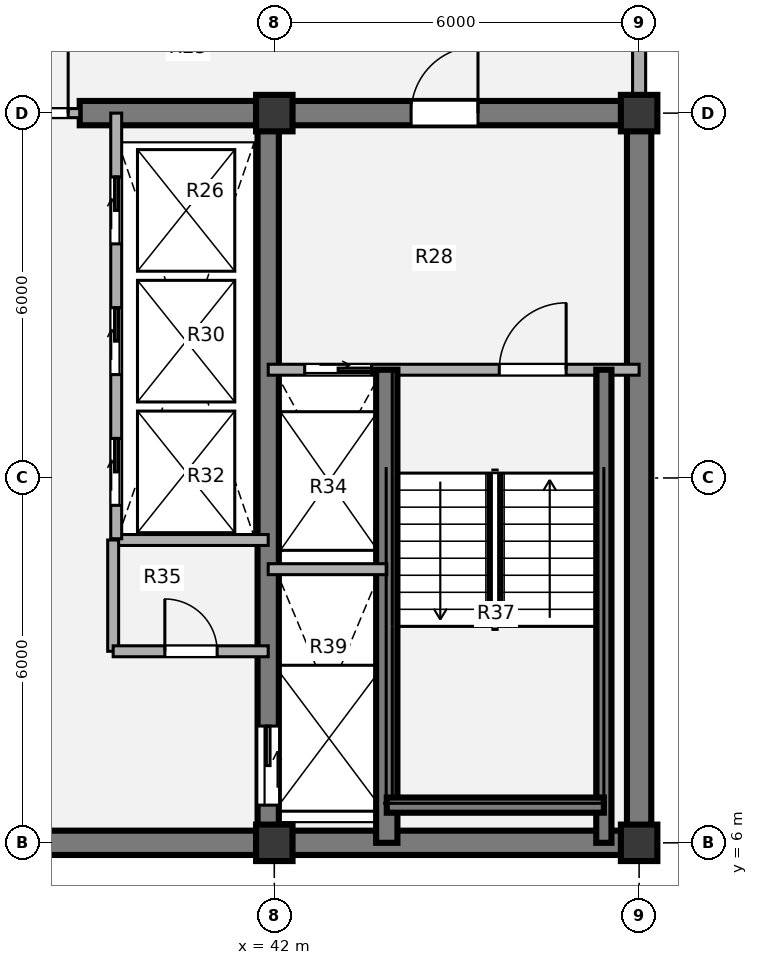
"""IFC4 building model, lengths in metres.
Left out: names, types, materials, properties, quantities, classifications, styles, units other than length and angle.
Written with IfcOpenShell. Run it as: python <this file> out.ifc"""

import sys

from ifc_helpers import new_model, si_unit, direction, frame, frame_2d, origin, origin_2d, place, context, subcontext, project, spatial, rectangle, extrude, source, transform, mapped, element, fill, save


model = new_model("IFC4")
c1 = context("Model", 3, precision=1e-05, world=origin(), true_north=direction((0.0, 1.0)))
c2 = subcontext(c1, "Body", "Model", "MODEL_VIEW")
j1 = project(units=[si_unit("LENGTHUNIT", "METRE"), si_unit("PLANEANGLEUNIT", "RADIAN")], contexts=[c1])
p1 = place(None, origin())
s1 = spatial("IfcSite", under=j1, at=p1, CompositionType="ELEMENT")
p2 = place(p1, origin())
s2 = spatial("IfcBuilding", under=s1, at=p2, CompositionType="ELEMENT")
p3 = place(p2, frame((0.0, 0.0, 223.02)))
s3 = spatial("IfcBuildingStorey", under=s2, at=p3, CompositionType="ELEMENT", Elevation=223.02)
m1 = source(origin(), c2, "Body", "SweptSolid", [
    extrude(rectangle(XDim=0.6, YDim=0.6, at=origin_2d()), origin(), (0.0, 0.0, 1.0), 3.78),
])
for number, where, z_axis, x_axis in (
    (1, (42.0, 6.0, 0.0), (0.0, 0.0, 1.0), (1.0, 0.0, 0.0)),
    (2, (48.0, 6.0, 0.0), (0.0, 0.0, 1.0), (1.0, 0.0, 0.0)),
    (3, (42.0, 18.0, 0.0), (0.0, 0.0, 1.0), (1.0, 0.0, 0.0)),
    (4, (48.0, 18.0, 0.0), (0.0, 0.0, 1.0), (1.0, 0.0, 0.0)),
):
    element("IfcColumn", number, at=place(p3, frame(where, z_axis=z_axis, x_axis=x_axis)), inside=s3, PredefinedType="COLUMN", context=c2, shape_type="MappedRepresentation", body=[
        mapped(m1, transform((0.0, 0.0, 0.0), x_axis=(1.0, 0.0, 0.0), y_axis=(0.0, 1.0, 0.0), z_axis=(0.0, 0.0, 1.0), scale=1.0)),
    ])
p4 = place(p3, frame((48.2, 6.0, 0.0), z_axis=(0.0, 0.0, 1.0), x_axis=(-1.0, 0.0, 0.0)))
e5 = element("IfcWall", 5, at=p4, inside=s3, PredefinedType="SHEAR", context=c2, shape_type="SweptSolid", body=[
    extrude(rectangle(XDim=24.4, YDim=0.4, at=frame_2d((12.2, 0.0))), origin(), (0.0, 0.0, 1.0), 3.78),
])
p5 = place(p3, frame((48.0, 18.0, 0.0), z_axis=(0.0, 0.0, 1.0), x_axis=(0.0, -1.0, 0.0)))
e6 = element("IfcWall", 6, at=p5, inside=s3, PredefinedType="SHEAR", context=c2, shape_type="SweptSolid", body=[
    extrude(rectangle(XDim=12.0, YDim=0.4, at=frame_2d((6.0, 0.0))), origin(), (0.0, 0.0, 1.0), 3.78),
])
p6 = place(p3, frame((38.8, 18.0, 0.0), z_axis=(0.0, 0.0, 1.0), x_axis=(1.0, 0.0, 0.0)))
e7 = element("IfcWall", 7, at=p6, inside=s3, PredefinedType="SHEAR", context=c2, shape_type="SweptSolid", body=[
    extrude(rectangle(XDim=9.4, YDim=0.4, at=frame_2d((4.7, 0.0))), origin(), (0.0, 0.0, 1.0), 3.78),
])
p7 = place(p6, frame((5.45, 0.0, 0.0)))
e8 = element("IfcOpeningElement", 8, at=p7, cuts=e7, PredefinedType="OPENING", context=c2, shape_type="SweptSolid", body=[
    extrude(rectangle(XDim=1.1, YDim=2.1, at=origin_2d()), frame((0.55, 0.21, 1.05), z_axis=(0.0, -1.0, 0.0), x_axis=(1.0, 0.0, 0.0)), (0.0, 0.0, 1.0), 0.42),
])
p8 = place(p3, frame((41.9, 18.0, 0.0), z_axis=(0.0, 0.0, 1.0), x_axis=(0.0, -1.0, 0.0)))
e9 = element("IfcWall", 9, at=p8, inside=s3, PredefinedType="SHEAR", context=c2, shape_type="SweptSolid", body=[
    extrude(rectangle(XDim=12.0, YDim=0.35, at=frame_2d((6.0, 0.0))), origin(), (0.0, 0.0, 1.0), 3.78),
])
p9 = place(p8, frame((10.08, 0.0, 0.0)))
e10 = element("IfcOpeningElement", 10, at=p9, cuts=e9, PredefinedType="OPENING", context=c2, shape_type="SweptSolid", body=[
    extrude(rectangle(XDim=1.3, YDim=2.1, at=origin_2d()), frame((0.65, 0.185, 1.05), z_axis=(0.0, -1.0, 0.0), x_axis=(1.0, 0.0, 0.0)), (0.0, 0.0, 1.0), 0.37),
])
p10 = place(p3, frame((48.0, 21.05, 0.0), z_axis=(0.0, 0.0, 1.0), x_axis=(0.0, -1.0, 0.0)))
e11 = element("IfcWall", 11, at=p10, inside=s3, PredefinedType="SOLIDWALL", context=c2, shape_type="SweptSolid", body=[
    extrude(rectangle(XDim=2.77, YDim=0.215, at=frame_2d((1.385, 0.0))), origin(), (0.0, 0.0, 1.0), 2.718),
])
p11 = place(p3, frame((39.35, 10.98, 0.0), z_axis=(0.0, 0.0, 1.0), x_axis=(1.0, 0.0, 0.0)))
e12 = element("IfcWall", 12, at=p11, inside=s3, PredefinedType="PARTITIONING", context=c2, shape_type="SweptSolid", body=[
    extrude(rectangle(XDim=2.55, YDim=0.18, at=frame_2d((1.275, 0.0))), origin(), (0.0, 0.0, 1.0), 3.5),
])
p12 = place(p3, frame((39.35, 9.15, 0.0), z_axis=(0.0, 0.0, 1.0), x_axis=(0.0, 1.0, 0.0)))
e13 = element("IfcWall", 13, at=p12, inside=s3, PredefinedType="PARTITIONING", context=c2, shape_type="SweptSolid", body=[
    extrude(rectangle(XDim=1.83, YDim=0.18, at=frame_2d((0.915, 0.0))), origin(), (0.0, 0.0, 1.0), 3.5),
])
p13 = place(p3, frame((39.35, 9.15, 0.0), z_axis=(0.0, 0.0, 1.0), x_axis=(1.0, 0.0, 0.0)))
e14 = element("IfcWall", 14, at=p13, inside=s3, PredefinedType="PARTITIONING", context=c2, shape_type="SweptSolid", body=[
    extrude(rectangle(XDim=2.55, YDim=0.18, at=frame_2d((1.275, 0.0))), origin(), (0.0, 0.0, 1.0), 3.5),
])
p14 = place(p13, frame((0.85, 0.0, 0.0)))
e15 = element("IfcOpeningElement", 15, at=p14, cuts=e14, PredefinedType="OPENING", context=c2, shape_type="SweptSolid", body=[
    extrude(rectangle(XDim=0.86, YDim=2.1, at=origin_2d()), frame((0.43, 0.1, 1.05), z_axis=(0.0, -1.0, 0.0), x_axis=(1.0, 0.0, 0.0)), (0.0, 0.0, 1.0), 0.2),
])
p15 = place(p3, frame((33.2, 18.0, 0.0), z_axis=(0.0, 0.0, 1.0), x_axis=(1.0, 0.0, 0.0)))
e16 = element("IfcWall", 16, at=p15, inside=s3, PredefinedType="PARTITIONING", context=c2, shape_type="SweptSolid", body=[
    extrude(rectangle(XDim=5.6, YDim=0.15, at=frame_2d((2.8, 0.0))), origin(), (0.0, 0.0, 1.0), 2.515),
])
p16 = place(p15, frame((0.19, 0.0, 0.0)))
e17 = element("IfcOpeningElement", 17, at=p16, cuts=e16, PredefinedType="OPENING", context=c2, shape_type="SweptSolid", body=[
    extrude(rectangle(XDim=1.1, YDim=2.1, at=origin_2d()), frame((0.55, 0.085, 1.05), z_axis=(0.0, -1.0, 0.0), x_axis=(1.0, 0.0, 0.0)), (0.0, 0.0, 1.0), 0.17),
])
p17 = place(p15, frame((4.31, 0.0, 0.0)))
e18 = element("IfcOpeningElement", 18, at=p17, cuts=e16, PredefinedType="OPENING", context=c2, shape_type="SweptSolid", body=[
    extrude(rectangle(XDim=1.1, YDim=2.1, at=origin_2d()), frame((0.55, 0.085, 1.05), z_axis=(0.0, -1.0, 0.0), x_axis=(1.0, 0.0, 0.0)), (0.0, 0.0, 1.0), 0.17),
])
p18 = place(p3, frame((41.9, 13.78, 0.0), z_axis=(0.0, 0.0, 1.0), x_axis=(1.0, 0.0, 0.0)))
e19 = element("IfcWall", 19, at=p18, inside=s3, PredefinedType="PARTITIONING", context=c2, shape_type="SweptSolid", body=[
    extrude(rectangle(XDim=6.1, YDim=0.18, at=frame_2d((3.05, 0.0))), origin(), (0.0, 0.0, 1.0), 3.5),
])
p19 = place(p18, frame((0.6, 0.0, 0.0)))
e20 = element("IfcOpeningElement", 20, at=p19, cuts=e19, PredefinedType="OPENING", context=c2, shape_type="SweptSolid", body=[
    extrude(rectangle(XDim=1.1, YDim=2.1, at=origin_2d()), frame((0.55, 0.1, 1.05), z_axis=(0.0, -1.0, 0.0), x_axis=(1.0, 0.0, 0.0)), (0.0, 0.0, 1.0), 0.2),
])
p20 = place(p18, frame((3.8, 0.0, 0.0)))
e21 = element("IfcOpeningElement", 21, at=p20, cuts=e19, PredefinedType="OPENING", context=c2, shape_type="SweptSolid", body=[
    extrude(rectangle(XDim=1.1, YDim=2.1, at=origin_2d()), frame((0.55, 0.1, 1.05), z_axis=(0.0, -1.0, 0.0), x_axis=(1.0, 0.0, 0.0)), (0.0, 0.0, 1.0), 0.2),
])
p21 = place(p3, frame((43.85, 6.0, 0.0), z_axis=(0.0, 0.0, 1.0), x_axis=(0.0, 1.0, 0.0)))
e22 = element("IfcWall", 22, at=p21, inside=s3, PredefinedType="SHEAR", context=c2, shape_type="SweptSolid", body=[
    extrude(rectangle(XDim=7.78, YDim=0.35, at=frame_2d((3.89, 0.0))), origin(), (0.0, 0.0, 1.0), 3.85),
])
p22 = place(p3, frame((47.42, 6.0, 0.0), z_axis=(0.0, 0.0, 1.0), x_axis=(0.0, 1.0, 0.0)))
e23 = element("IfcWall", 23, at=p22, inside=s3, PredefinedType="SHEAR", context=c2, shape_type="SweptSolid", body=[
    extrude(rectangle(XDim=7.78, YDim=0.25, at=frame_2d((3.89, 0.0))), origin(), (0.0, 0.0, 1.0), 3.85),
])
p23 = place(p3, frame((43.85, 6.62, 0.0), z_axis=(0.0, 0.0, 1.0), x_axis=(1.0, 0.0, 0.0)))
e24 = element("IfcWall", 24, at=p23, inside=s3, PredefinedType="SHEAR", context=c2, shape_type="SweptSolid", body=[
    extrude(rectangle(XDim=3.57, YDim=0.25, at=frame_2d((1.785, 0.0))), origin(), (0.0, 0.0, 1.0), 3.85),
])
p24 = place(p3, frame((41.9, 10.5, 0.0), z_axis=(0.0, 0.0, 1.0), x_axis=(1.0, 0.0, 0.0)))
e25 = element("IfcWall", 25, at=p24, inside=s3, PredefinedType="PARTITIONING", context=c2, shape_type="SweptSolid", body=[
    extrude(rectangle(XDim=1.95, YDim=0.18, at=frame_2d((0.975, 0.0))), origin(), (0.0, 0.0, 1.0), 3.5),
])
p25 = place(p3, frame((39.4, 11.0, 0.0), z_axis=(0.0, 0.0, 1.0), x_axis=(0.0, 1.0, 0.0)))
e26 = element("IfcWall", 26, at=p25, inside=s3, PredefinedType="PARTITIONING", context=c2, shape_type="SweptSolid", body=[
    extrude(rectangle(XDim=7.0, YDim=0.18, at=frame_2d((3.5, 0.0))), origin(), (0.0, 0.0, 1.0), 3.5),
])
p26 = place(p25, frame((0.55, 0.0, 0.0)))
e27 = element("IfcOpeningElement", 27, at=p26, cuts=e26, PredefinedType="OPENING", context=c2, shape_type="SweptSolid", body=[
    extrude(rectangle(XDim=1.1, YDim=2.1, at=origin_2d()), frame((0.55, 0.1, 1.05), z_axis=(0.0, -1.0, 0.0), x_axis=(1.0, 0.0, 0.0)), (0.0, 0.0, 1.0), 0.2),
])
p27 = place(p25, frame((2.7, 0.0, 0.0)))
e28 = element("IfcOpeningElement", 28, at=p27, cuts=e26, PredefinedType="OPENING", context=c2, shape_type="SweptSolid", body=[
    extrude(rectangle(XDim=1.1, YDim=2.1, at=origin_2d()), frame((0.55, 0.1, 1.05), z_axis=(0.0, -1.0, 0.0), x_axis=(1.0, 0.0, 0.0)), (0.0, 0.0, 1.0), 0.2),
])
p28 = place(p25, frame((4.85, 0.0, 0.0)))
e29 = element("IfcOpeningElement", 29, at=p28, cuts=e26, PredefinedType="OPENING", context=c2, shape_type="SweptSolid", body=[
    extrude(rectangle(XDim=1.1, YDim=2.1, at=origin_2d()), frame((0.55, 0.1, 1.05), z_axis=(0.0, -1.0, 0.0), x_axis=(1.0, 0.0, 0.0)), (0.0, 0.0, 1.0), 0.2),
])
m2 = source(origin(), c2, "Body", "SweptSolid", [
    extrude(rectangle(XDim=0.86, YDim=2.1, at=origin_2d()), frame((0.43, 0.025, 1.05), z_axis=(0.0, -1.0, 0.0), x_axis=(1.0, 0.0, 0.0)), (0.0, 0.0, 1.0), 0.05),
])
p29 = place(p14, origin())
e30 = element("IfcDoor", 30, at=p29, inside=s3, OperationType="SINGLE_SWING_LEFT", PredefinedType="DOOR", context=c2, shape_type="MappedRepresentation", body=[
    mapped(m2, transform((0.0, 0.0, 0.0), x_axis=(1.0, 0.0, 0.0), y_axis=(0.0, 1.0, 0.0), z_axis=(0.0, 0.0, 1.0), scale=1.0)),
])
fill(e15, e30)
m3 = source(origin(), c2, "Body", "SweptSolid", [
    extrude(rectangle(XDim=1.1, YDim=2.1, at=origin_2d()), frame((0.55, 0.025, 1.05), z_axis=(0.0, -1.0, 0.0), x_axis=(1.0, 0.0, 0.0)), (0.0, 0.0, 1.0), 0.05),
])
p30 = place(p17, origin())
e31 = element("IfcDoor", 31, at=p30, inside=s3, OperationType="SINGLE_SWING_RIGHT", PredefinedType="DOOR", context=c2, shape_type="MappedRepresentation", body=[
    mapped(m3, transform((0.0, 0.0, 0.0), x_axis=(1.0, 0.0, 0.0), y_axis=(0.0, 1.0, 0.0), z_axis=(0.0, 0.0, 1.0), scale=1.0)),
])
fill(e18, e31)
m4 = source(origin(), c2, "Body", "SweptSolid", [
    extrude(rectangle(XDim=1.1, YDim=2.1, at=origin_2d()), frame((0.55, 0.025, 1.05), z_axis=(0.0, -1.0, 0.0), x_axis=(1.0, 0.0, 0.0)), (0.0, 0.0, 1.0), 0.05),
])
p31 = place(p19, origin())
e32 = element("IfcDoor", 32, at=p31, inside=s3, OperationType="SLIDING_TO_RIGHT", PredefinedType="DOOR", context=c2, shape_type="MappedRepresentation", body=[
    mapped(m4, transform((0.0, 0.0, 0.0), x_axis=(1.0, 0.0, 0.0), y_axis=(0.0, 1.0, 0.0), z_axis=(0.0, 0.0, 1.0), scale=1.0)),
])
fill(e20, e32)
m5 = source(origin(), c2, "Body", "SweptSolid", [
    extrude(rectangle(XDim=1.1, YDim=2.1, at=origin_2d()), frame((0.55, 0.025, 1.05), z_axis=(0.0, -1.0, 0.0), x_axis=(1.0, 0.0, 0.0)), (0.0, 0.0, 1.0), 0.05),
])
p32 = place(p20, origin())
e33 = element("IfcDoor", 33, at=p32, inside=s3, OperationType="SINGLE_SWING_RIGHT", PredefinedType="DOOR", context=c2, shape_type="MappedRepresentation", body=[
    mapped(m5, transform((0.0, 0.0, 0.0), x_axis=(1.0, 0.0, 0.0), y_axis=(0.0, 1.0, 0.0), z_axis=(0.0, 0.0, 1.0), scale=1.0)),
])
fill(e21, e33)
m6 = source(origin(), c2, "Body", "SweptSolid", [
    extrude(rectangle(XDim=1.3, YDim=2.1, at=origin_2d()), frame((0.65, 0.025, 1.05), z_axis=(0.0, -1.0, 0.0), x_axis=(1.0, 0.0, 0.0)), (0.0, 0.0, 1.0), 0.05),
])
p33 = place(p9, origin())
e34 = element("IfcDoor", 34, at=p33, inside=s3, OperationType="SLIDING_TO_LEFT", PredefinedType="DOOR", context=c2, shape_type="MappedRepresentation", body=[
    mapped(m6, transform((0.0, 0.0, 0.0), x_axis=(1.0, 0.0, 0.0), y_axis=(0.0, 1.0, 0.0), z_axis=(0.0, 0.0, 1.0), scale=1.0)),
])
fill(e10, e34)
p34 = place(p7, origin())
e35 = element("IfcDoor", 35, at=p34, inside=s3, OperationType="SINGLE_SWING_RIGHT", PredefinedType="DOOR", context=c2, shape_type="MappedRepresentation", body=[
    mapped(m3, transform((0.0, 0.0, 0.0), x_axis=(1.0, 0.0, 0.0), y_axis=(0.0, 1.0, 0.0), z_axis=(0.0, 0.0, 1.0), scale=1.0)),
])
fill(e8, e35)
p35 = place(p26, origin())
e36 = element("IfcDoor", 36, at=p35, inside=s3, OperationType="SLIDING_TO_RIGHT", PredefinedType="DOOR", context=c2, shape_type="MappedRepresentation", body=[
    mapped(m4, transform((0.0, 0.0, 0.0), x_axis=(1.0, 0.0, 0.0), y_axis=(0.0, 1.0, 0.0), z_axis=(0.0, 0.0, 1.0), scale=1.0)),
])
fill(e27, e36)
p36 = place(p27, origin())
e37 = element("IfcDoor", 37, at=p36, inside=s3, OperationType="SLIDING_TO_RIGHT", PredefinedType="DOOR", context=c2, shape_type="MappedRepresentation", body=[
    mapped(m4, transform((0.0, 0.0, 0.0), x_axis=(1.0, 0.0, 0.0), y_axis=(0.0, 1.0, 0.0), z_axis=(0.0, 0.0, 1.0), scale=1.0)),
])
fill(e28, e37)
p37 = place(p28, origin())
e38 = element("IfcDoor", 38, at=p37, inside=s3, OperationType="SLIDING_TO_RIGHT", PredefinedType="DOOR", context=c2, shape_type="MappedRepresentation", body=[
    mapped(m4, transform((0.0, 0.0, 0.0), x_axis=(1.0, 0.0, 0.0), y_axis=(0.0, 1.0, 0.0), z_axis=(0.0, 0.0, 1.0), scale=1.0)),
])
fill(e29, e38)
save(model, sys.argv[1])
